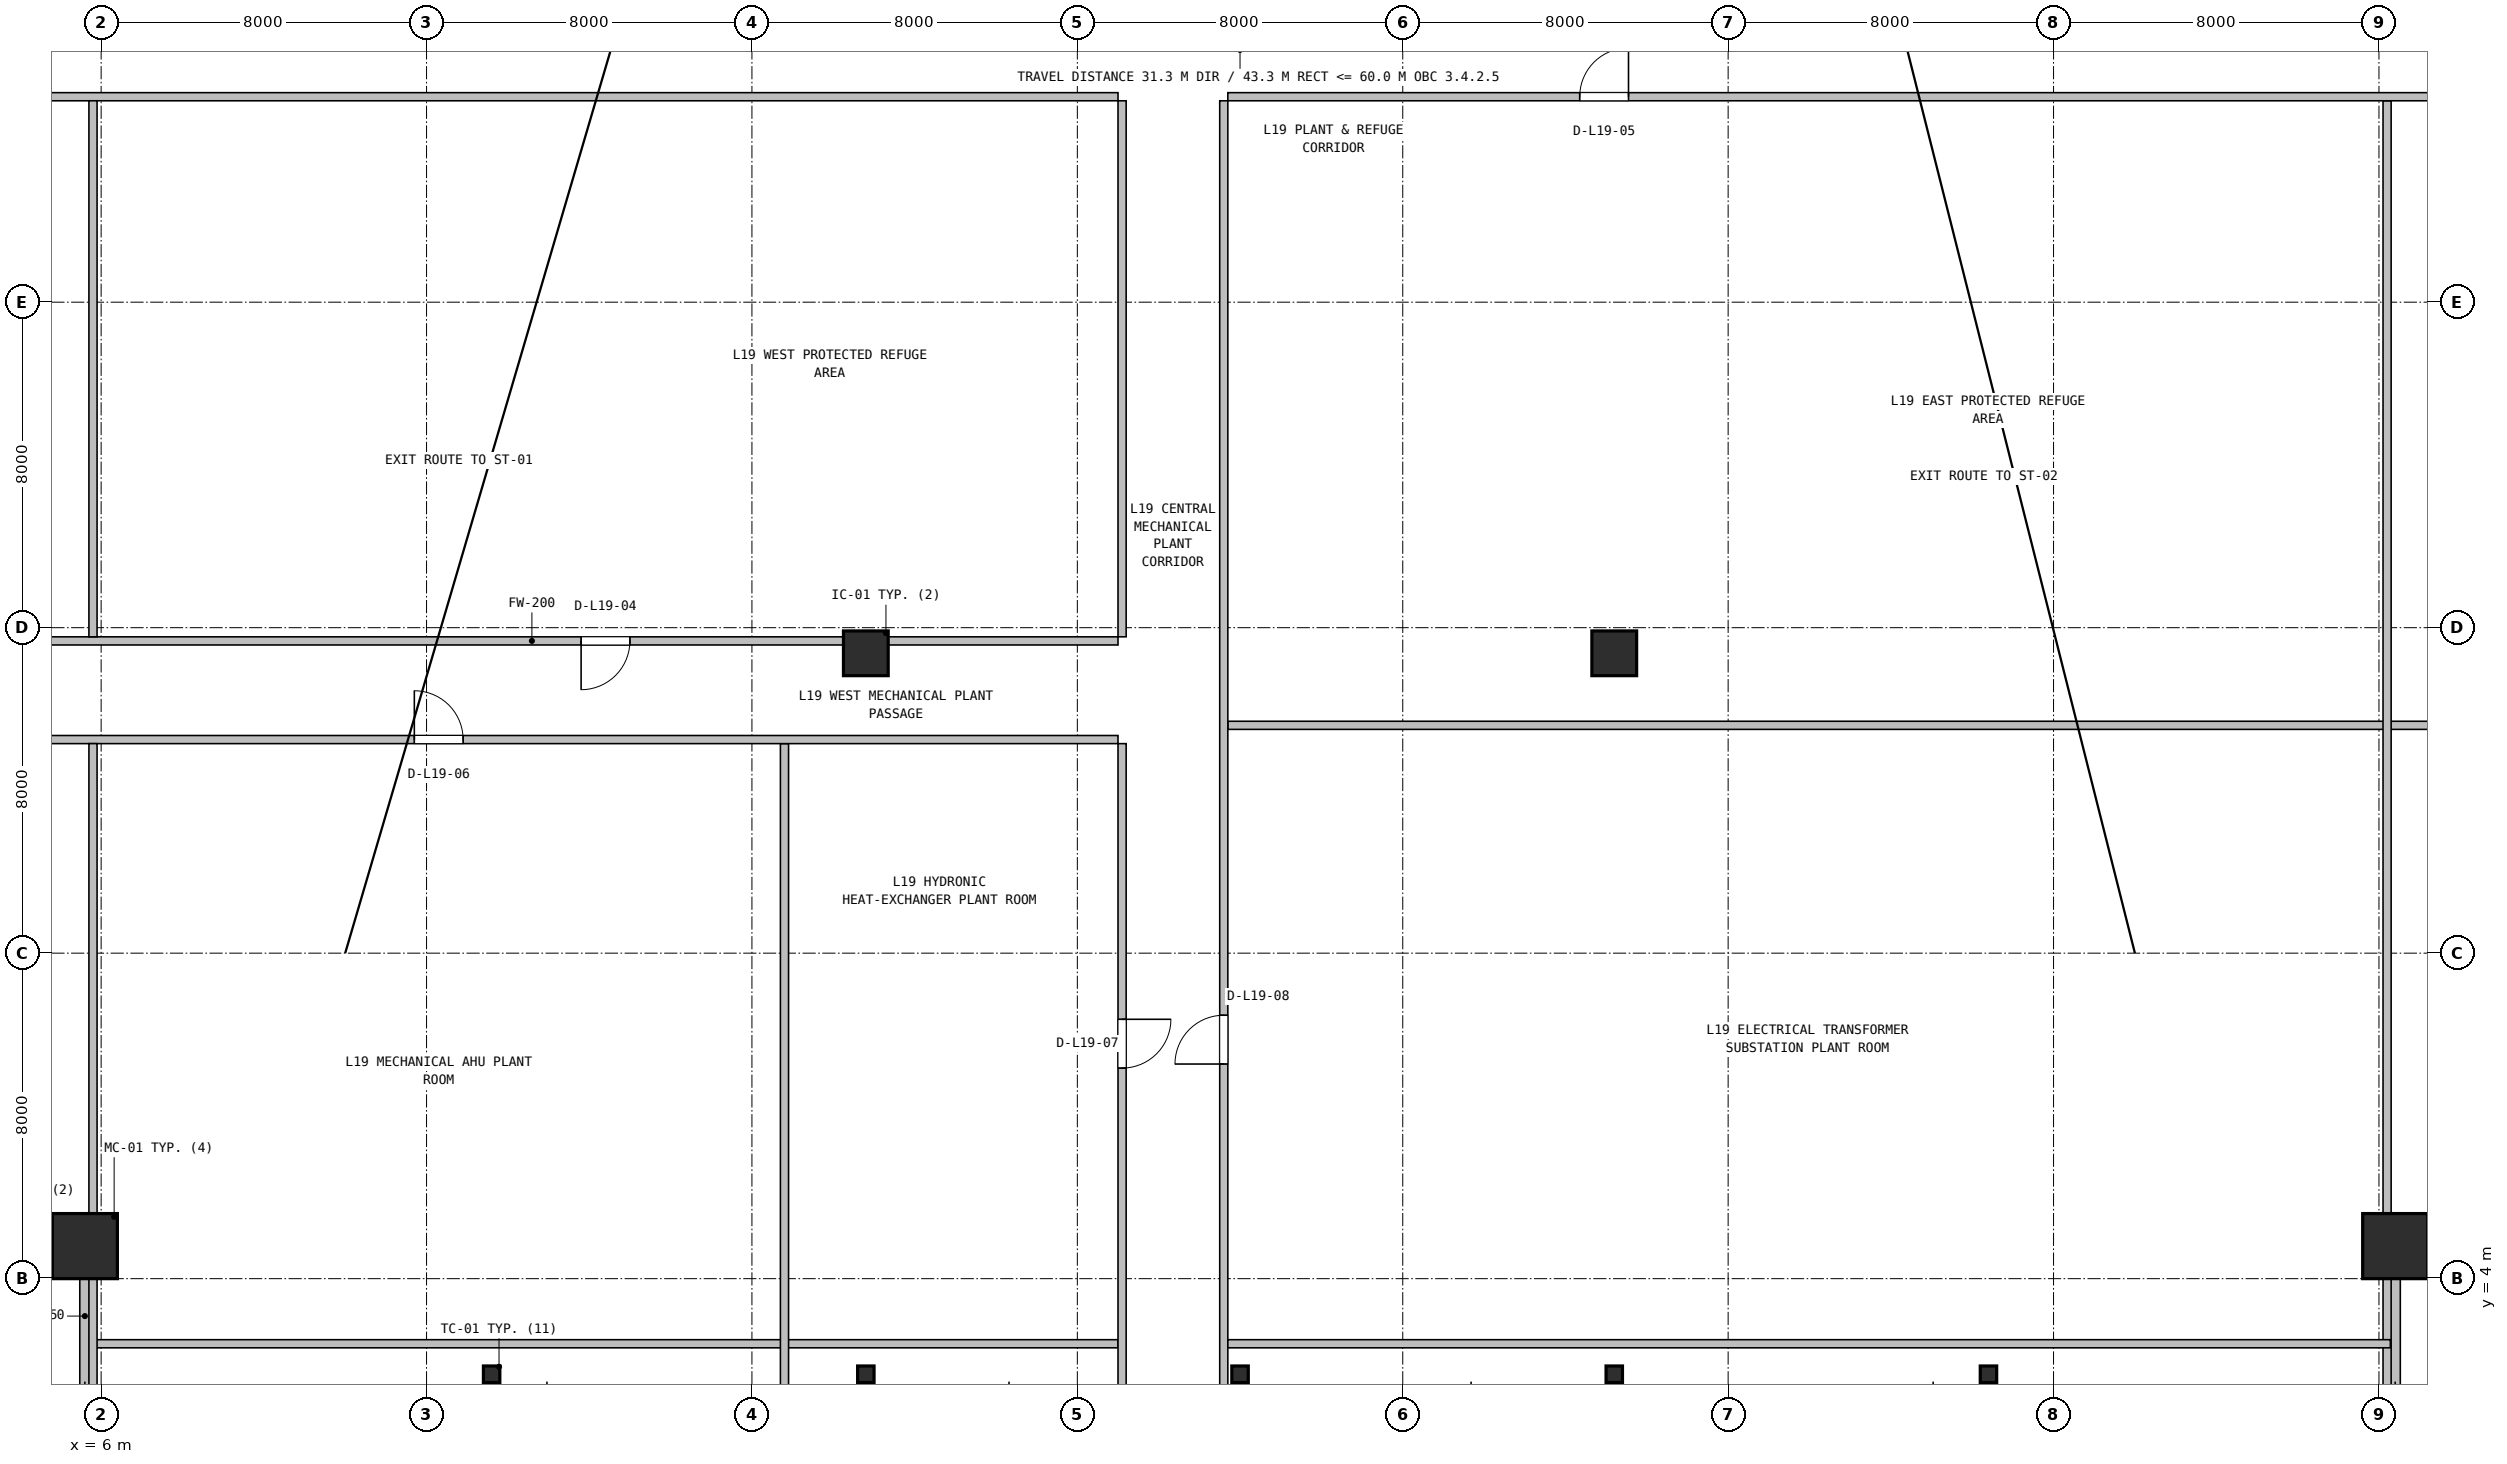
"""IFC4 building model, lengths in metres.
Left out: names, types, materials, properties, quantities, classifications, styles, units other than length and angle.
Written with IfcOpenShell. Run it as: python <this file> out.ifc"""

import sys

from ifc_helpers import new_model, si_unit, direction, frame, frame_2d, origin, origin_2d, place, context, subcontext, project, spatial, rectangle, hollow_rectangle, i_section, extrude, source, transform, mapped, element, fill, save


model = new_model("IFC4")
c1 = context("Model", 3, precision=1e-05, world=origin(), true_north=direction((0.0, 1.0)))
c2 = subcontext(c1, "Body", "Model", "MODEL_VIEW")
j1 = project(units=[si_unit("LENGTHUNIT", "METRE"), si_unit("PLANEANGLEUNIT", "RADIAN")], contexts=[c1])
p1 = place(None, origin())
s1 = spatial("IfcSite", under=j1, at=p1, CompositionType="ELEMENT")
p2 = place(p1, origin())
s2 = spatial("IfcBuilding", under=s1, at=p2, CompositionType="ELEMENT")
p3 = place(p2, frame((0.0, 0.0, 82.2)))
s3 = spatial("IfcBuildingStorey", under=s2, at=p3, CompositionType="ELEMENT", Elevation=82.2)
m1 = source(origin(), c2, "Body", "SweptSolid", [
    extrude(hollow_rectangle(XDim=1.6, YDim=1.6, WallThickness=0.06, at=origin_2d()), origin(), (0.0, 0.0, 1.0), 4.8),
])
for number, where, z_axis, x_axis in (
    (1, (5.6, 4.8, 0.0), (0.0, 0.0, 1.0), (1.0, 0.0, 0.0)),
    (2, (62.4, 4.8, 0.0), (0.0, 0.0, 1.0), (1.0, 0.0, 0.0)),
):
    element("IfcColumn", number, at=place(p3, frame(where, z_axis=z_axis, x_axis=x_axis)), inside=s3, PredefinedType="COLUMN", context=c2, shape_type="MappedRepresentation", body=[
        mapped(m1, transform((0.0, 0.0, 0.0), x_axis=(1.0, 0.0, 0.0), y_axis=(0.0, 1.0, 0.0), z_axis=(0.0, 0.0, 1.0), scale=1.0)),
    ])
m2 = source(origin(), c2, "Body", "SweptSolid", [
    extrude(i_section(OverallWidth=0.404, OverallDepth=0.407, WebThickness=0.027, FlangeThickness=0.044, FilletRadius=0.018, at=origin_2d()), origin(), (0.0, 0.0, 1.0), 4.8),
])
for number, where, z_axis, x_axis in (
    (3, (15.6, 1.65, 0.0), (0.0, 0.0, 1.0), (1.0, 0.0, 0.0)),
    (4, (24.8, 1.65, 0.0), (0.0, 0.0, 1.0), (1.0, 0.0, 0.0)),
    (5, (34.0, 1.65, 0.0), (0.0, 0.0, 1.0), (1.0, 0.0, 0.0)),
    (6, (43.2, 1.65, 0.0), (0.0, 0.0, 1.0), (1.0, 0.0, 0.0)),
    (7, (52.4, 1.65, 0.0), (0.0, 0.0, 1.0), (1.0, 0.0, 0.0)),
):
    element("IfcColumn", number, at=place(p3, frame(where, z_axis=z_axis, x_axis=x_axis)), inside=s3, PredefinedType="COLUMN", context=c2, shape_type="MappedRepresentation", body=[
        mapped(m2, transform((0.0, 0.0, 0.0), x_axis=(1.0, 0.0, 0.0), y_axis=(0.0, 1.0, 0.0), z_axis=(0.0, 0.0, 1.0), scale=1.0)),
    ])
m3 = source(origin(), c2, "Body", "SweptSolid", [
    extrude(rectangle(XDim=1.1, YDim=1.1, at=origin_2d()), origin(), (0.0, 0.0, 1.0), 4.8),
])
for number, where, z_axis, x_axis in (
    (8, (24.8, 19.37, 0.0), (0.0, 0.0, 1.0), (1.0, 0.0, 0.0)),
    (9, (43.2, 19.37, 0.0), (0.0, 0.0, 1.0), (1.0, 0.0, 0.0)),
):
    element("IfcColumn", number, at=place(p3, frame(where, z_axis=z_axis, x_axis=x_axis)), inside=s3, PredefinedType="COLUMN", context=c2, shape_type="MappedRepresentation", body=[
        mapped(m3, transform((0.0, 0.0, 0.0), x_axis=(1.0, 0.0, 0.0), y_axis=(0.0, 1.0, 0.0), z_axis=(0.0, 0.0, 1.0), scale=1.0)),
    ])
for number, where, z_axis, x_axis in (
    (10, (5.6, 1.28, 0.0), (0.0, 0.0, 1.0), (0.0, 1.0, 0.0)),
    (11, (62.4, 1.28, 0.0), (0.0, 0.0, 1.0), (0.0, 1.0, 0.0)),
):
    element("IfcWall", number, at=place(p3, frame(where, z_axis=z_axis, x_axis=x_axis)), inside=s3, PredefinedType="SOLIDWALL", context=c2, shape_type="SweptSolid", body=[
        extrude(rectangle(XDim=3.6, YDim=0.25, at=frame_2d((1.8, 0.0))), origin(), (0.0, 0.0, 1.0), 2.925),
    ])
p4 = place(p3, frame((2.18, 19.675, 0.0), z_axis=(0.0, 0.0, 1.0), x_axis=(1.0, 0.0, 0.0)))
e12 = element("IfcWall", 12, at=p4, inside=s3, PredefinedType="SOLIDWALL", context=c2, shape_type="SweptSolid", body=[
    extrude(rectangle(XDim=28.82, YDim=0.2, at=frame_2d((14.41, 0.0))), origin(), (0.0, 0.0, 1.0), 2.925),
])
p5 = place(p4, frame((15.62, 0.0, 0.0)))
e13 = element("IfcOpeningElement", 13, at=p5, cuts=e12, PredefinedType="OPENING", context=c2, shape_type="SweptSolid", body=[
    extrude(rectangle(XDim=1.2, YDim=2.1, at=frame_2d((0.6, 1.05))), frame((0.0, 0.11, 0.0), z_axis=(0.0, -1.0, 0.0), x_axis=(1.0, 0.0, 0.0)), (0.0, 0.0, 1.0), 0.22),
])
p6 = place(p3, frame((31.1, 19.775, 0.0), z_axis=(0.0, 0.0, 1.0), x_axis=(0.0, 1.0, 0.0)))
e14 = element("IfcWall", 14, at=p6, inside=s3, PredefinedType="SOLIDWALL", context=c2, shape_type="SweptSolid", body=[
    extrude(rectangle(XDim=13.175, YDim=0.2, at=frame_2d((6.587, 0.0))), origin(), (0.0, 0.0, 1.0), 3.195),
])
p7 = place(p3, frame((2.18, 33.05, 0.0), z_axis=(0.0, 0.0, 1.0), x_axis=(1.0, 0.0, 0.0)))
e15 = element("IfcWall", 15, at=p7, inside=s3, PredefinedType="SOLIDWALL", context=c2, shape_type="SweptSolid", body=[
    extrude(rectangle(XDim=28.82, YDim=0.2, at=frame_2d((14.41, 0.0))), origin(), (0.0, 0.0, 1.0), 2.925),
])
p8 = place(p3, frame((5.8, 19.775, 0.0), z_axis=(0.0, 0.0, 1.0), x_axis=(0.0, 1.0, 0.0)))
e16 = element("IfcWall", 16, at=p8, inside=s3, PredefinedType="SOLIDWALL", context=c2, shape_type="SweptSolid", body=[
    extrude(rectangle(XDim=13.175, YDim=0.2, at=frame_2d((6.587, 0.0))), origin(), (0.0, 0.0, 1.0), 3.195),
])
p9 = place(p3, frame((33.7, 17.6, 0.0), z_axis=(0.0, 0.0, 1.0), x_axis=(1.0, 0.0, 0.0)))
e17 = element("IfcWall", 17, at=p9, inside=s3, PredefinedType="SOLIDWALL", context=c2, shape_type="SweptSolid", body=[
    extrude(rectangle(XDim=32.12, YDim=0.2, at=frame_2d((16.06, 0.0))), origin(), (0.0, 0.0, 1.0), 2.925),
])
p10 = place(p3, frame((62.2, 1.38, 0.0), z_axis=(0.0, 0.0, 1.0), x_axis=(0.0, 1.0, 0.0)))
e18 = element("IfcWall", 18, at=p10, inside=s3, PredefinedType="SOLIDWALL", context=c2, shape_type="SweptSolid", body=[
    extrude(rectangle(XDim=31.57, YDim=0.2, at=frame_2d((15.785, 0.0))), origin(), (0.0, 0.0, 1.0), 2.925),
])
p11 = place(p3, frame((33.7, 33.05, 0.0), z_axis=(0.0, 0.0, 1.0), x_axis=(1.0, 0.0, 0.0)))
e19 = element("IfcWall", 19, at=p11, inside=s3, PredefinedType="SOLIDWALL", context=c2, shape_type="SweptSolid", body=[
    extrude(rectangle(XDim=32.12, YDim=0.2, at=frame_2d((16.06, 0.0))), origin(), (0.0, 0.0, 1.0), 2.925),
])
p12 = place(p11, frame((8.65, 0.0, 0.0)))
e20 = element("IfcOpeningElement", 20, at=p12, cuts=e19, PredefinedType="OPENING", context=c2, shape_type="SweptSolid", body=[
    extrude(rectangle(XDim=1.2, YDim=2.1, at=frame_2d((0.6, 1.05))), frame((0.0, 0.11, 0.0), z_axis=(0.0, -1.0, 0.0), x_axis=(1.0, 0.0, 0.0)), (0.0, 0.0, 1.0), 0.22),
])
p13 = place(p3, frame((33.6, 1.38, 0.0), z_axis=(0.0, 0.0, 1.0), x_axis=(0.0, 1.0, 0.0)))
e21 = element("IfcWall", 21, at=p13, inside=s3, PredefinedType="SOLIDWALL", context=c2, shape_type="SweptSolid", body=[
    extrude(rectangle(XDim=31.57, YDim=0.2, at=frame_2d((15.785, 0.0))), origin(), (0.0, 0.0, 1.0), 2.925),
])
p14 = place(p13, frame((7.895, 0.0, 0.0)))
e22 = element("IfcOpeningElement", 22, at=p14, cuts=e21, PredefinedType="OPENING", context=c2, shape_type="SweptSolid", body=[
    extrude(rectangle(XDim=1.2, YDim=2.1, at=frame_2d((0.6, 1.05))), frame((0.0, 0.11, 0.0), z_axis=(0.0, -1.0, 0.0), x_axis=(1.0, 0.0, 0.0)), (0.0, 0.0, 1.0), 0.22),
])
p15 = place(p3, frame((5.72, 2.4, 0.0), z_axis=(0.0, 0.0, 1.0), x_axis=(1.0, 0.0, 0.0)))
e23 = element("IfcWall", 23, at=p15, inside=s3, PredefinedType="SOLIDWALL", context=c2, shape_type="SweptSolid", body=[
    extrude(rectangle(XDim=25.28, YDim=0.2, at=frame_2d((12.64, 0.0))), origin(), (0.0, 0.0, 1.0), 2.925),
])
p16 = place(p3, frame((22.8, 1.38, 0.0), z_axis=(0.0, 0.0, 1.0), x_axis=(0.0, 1.0, 0.0)))
e24 = element("IfcWall", 24, at=p16, inside=s3, PredefinedType="SOLIDWALL", context=c2, shape_type="SweptSolid", body=[
    extrude(rectangle(XDim=15.77, YDim=0.2, at=frame_2d((7.885, 0.0))), origin(), (0.0, 0.0, 1.0), 2.925),
])
p17 = place(p3, frame((2.18, 17.25, 0.0), z_axis=(0.0, 0.0, 1.0), x_axis=(1.0, 0.0, 0.0)))
e25 = element("IfcWall", 25, at=p17, inside=s3, PredefinedType="SOLIDWALL", context=c2, shape_type="SweptSolid", body=[
    extrude(rectangle(XDim=28.82, YDim=0.2, at=frame_2d((14.41, 0.0))), origin(), (0.0, 0.0, 1.0), 2.925),
])
p18 = place(p17, frame((11.52, 0.0, 0.0)))
e26 = element("IfcOpeningElement", 26, at=p18, cuts=e25, PredefinedType="OPENING", context=c2, shape_type="SweptSolid", body=[
    extrude(rectangle(XDim=1.2, YDim=2.1, at=frame_2d((0.6, 1.05))), frame((0.0, 0.11, 0.0), z_axis=(0.0, -1.0, 0.0), x_axis=(1.0, 0.0, 0.0)), (0.0, 0.0, 1.0), 0.22),
])
p19 = place(p3, frame((5.8, 1.38, 0.0), z_axis=(0.0, 0.0, 1.0), x_axis=(0.0, 1.0, 0.0)))
e27 = element("IfcWall", 27, at=p19, inside=s3, PredefinedType="SOLIDWALL", context=c2, shape_type="SweptSolid", body=[
    extrude(rectangle(XDim=15.77, YDim=0.2, at=frame_2d((7.885, 0.0))), origin(), (0.0, 0.0, 1.0), 2.925),
])
p20 = place(p3, frame((31.1, 1.38, 0.0), z_axis=(0.0, 0.0, 1.0), x_axis=(0.0, 1.0, 0.0)))
e28 = element("IfcWall", 28, at=p20, inside=s3, PredefinedType="SOLIDWALL", context=c2, shape_type="SweptSolid", body=[
    extrude(rectangle(XDim=15.77, YDim=0.2, at=frame_2d((7.885, 0.0))), origin(), (0.0, 0.0, 1.0), 2.925),
])
p21 = place(p20, frame((7.795, 0.0, 0.0)))
e29 = element("IfcOpeningElement", 29, at=p21, cuts=e28, PredefinedType="OPENING", context=c2, shape_type="SweptSolid", body=[
    extrude(rectangle(XDim=1.2, YDim=2.1, at=frame_2d((0.6, 1.05))), frame((0.0, 0.11, 0.0), z_axis=(0.0, -1.0, 0.0), x_axis=(1.0, 0.0, 0.0)), (0.0, 0.0, 1.0), 0.22),
])
p22 = place(p3, frame((33.7, 2.4, 0.0), z_axis=(0.0, 0.0, 1.0), x_axis=(1.0, 0.0, 0.0)))
e30 = element("IfcWall", 30, at=p22, inside=s3, PredefinedType="SOLIDWALL", context=c2, shape_type="SweptSolid", body=[
    extrude(rectangle(XDim=28.58, YDim=0.2, at=frame_2d((14.29, 0.0))), origin(), (0.0, 0.0, 1.0), 2.925),
])
m4 = source(origin(), c2, "Body", "SweptSolid", [
    extrude(rectangle(XDim=1.2, YDim=2.1, at=frame_2d((0.6, 1.05))), frame((0.0, 0.025, 0.0), z_axis=(0.0, -1.0, 0.0), x_axis=(1.0, 0.0, 0.0)), (0.0, 0.0, 1.0), 0.05),
])
p23 = place(p5, frame((1.2, 0.0, 0.0), z_axis=(0.0, 0.0, 1.0), x_axis=(-1.0, 0.0, 0.0)))
e31 = element("IfcDoor", 31, at=p23, inside=s3, OperationType="SINGLE_SWING_LEFT", PredefinedType="DOOR", context=c2, shape_type="MappedRepresentation", body=[
    mapped(m4, transform((0.0, 0.0, 0.0), x_axis=(1.0, 0.0, 0.0), y_axis=(0.0, 1.0, 0.0), z_axis=(0.0, 0.0, 1.0), scale=1.0)),
])
fill(e13, e31)
p24 = place(p12, origin())
e32 = element("IfcDoor", 32, at=p24, inside=s3, OperationType="SINGLE_SWING_RIGHT", PredefinedType="DOOR", context=c2, shape_type="MappedRepresentation", body=[
    mapped(m4, transform((0.0, 0.0, 0.0), x_axis=(1.0, 0.0, 0.0), y_axis=(0.0, 1.0, 0.0), z_axis=(0.0, 0.0, 1.0), scale=1.0)),
])
fill(e20, e32)
p25 = place(p18, origin())
e33 = element("IfcDoor", 33, at=p25, inside=s3, OperationType="SINGLE_SWING_LEFT", PredefinedType="DOOR", context=c2, shape_type="MappedRepresentation", body=[
    mapped(m4, transform((0.0, 0.0, 0.0), x_axis=(1.0, 0.0, 0.0), y_axis=(0.0, 1.0, 0.0), z_axis=(0.0, 0.0, 1.0), scale=1.0)),
])
fill(e26, e33)
p26 = place(p21, frame((1.2, 0.0, 0.0), z_axis=(0.0, 0.0, 1.0), x_axis=(-1.0, 0.0, 0.0)))
e34 = element("IfcDoor", 34, at=p26, inside=s3, OperationType="SINGLE_SWING_RIGHT", PredefinedType="DOOR", context=c2, shape_type="MappedRepresentation", body=[
    mapped(m4, transform((0.0, 0.0, 0.0), x_axis=(1.0, 0.0, 0.0), y_axis=(0.0, 1.0, 0.0), z_axis=(0.0, 0.0, 1.0), scale=1.0)),
])
fill(e29, e34)
p27 = place(p14, origin())
e35 = element("IfcDoor", 35, at=p27, inside=s3, OperationType="SINGLE_SWING_LEFT", PredefinedType="DOOR", context=c2, shape_type="MappedRepresentation", body=[
    mapped(m4, transform((0.0, 0.0, 0.0), x_axis=(1.0, 0.0, 0.0), y_axis=(0.0, 1.0, 0.0), z_axis=(0.0, 0.0, 1.0), scale=1.0)),
])
fill(e22, e35)
save(model, sys.argv[1])
